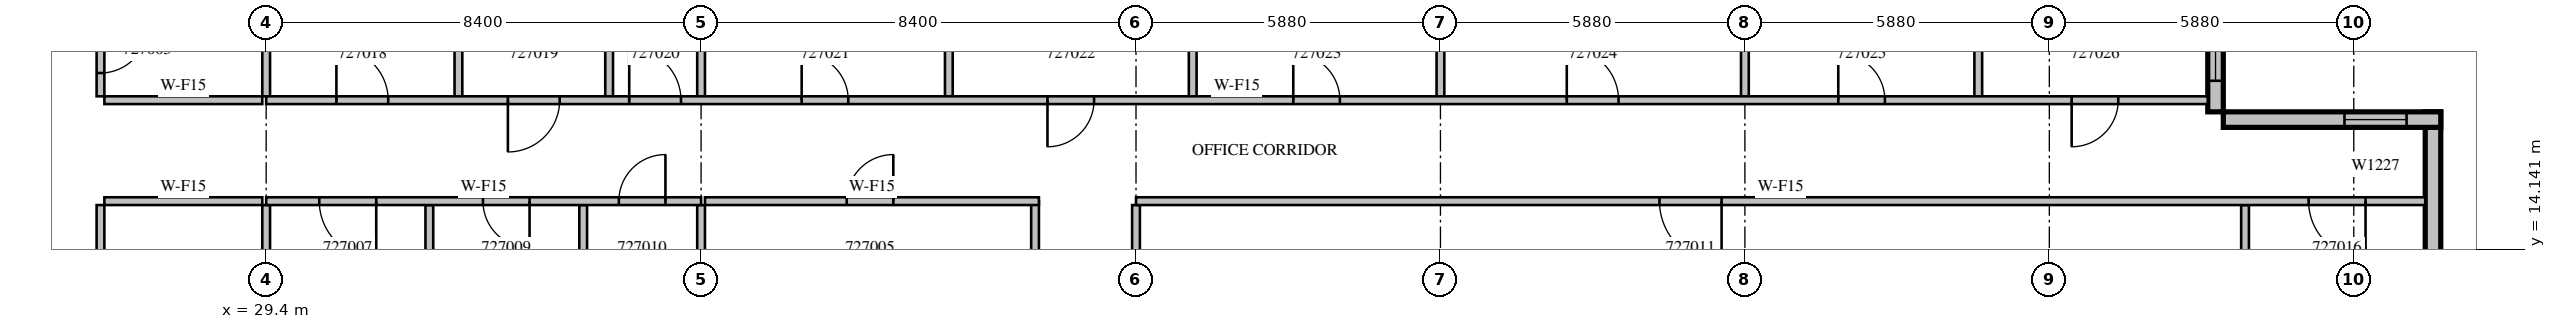
"""IFC4 building model, lengths in metres.
Left out: names, types, materials, properties, quantities, classifications, styles, units other than length and angle.
Written with IfcOpenShell. Run it as: python <this file> out.ifc"""

import sys

from ifc_helpers import new_model, si_unit, direction, frame, frame_2d, origin, place, context, subcontext, project, spatial, rectangle, extrude, source, transform, mapped, element, fill, save


model = new_model("IFC4")
c1 = context("Model", 3, precision=1e-05, world=origin(), true_north=direction((0.0, 1.0)))
c2 = subcontext(c1, "Body", "Model", "MODEL_VIEW")
j1 = project(units=[si_unit("LENGTHUNIT", "METRE"), si_unit("PLANEANGLEUNIT", "RADIAN")], contexts=[c1])
p1 = place(None, origin())
s1 = spatial("IfcSite", under=j1, at=p1, CompositionType="ELEMENT")
p2 = place(p1, origin())
s2 = spatial("IfcBuilding", under=s1, at=p2, CompositionType="ELEMENT")
p3 = place(p2, frame((0.0, 0.0, 124.5)))
s3 = spatial("IfcBuildingStorey", under=s2, at=p3, CompositionType="ELEMENT", Elevation=124.5)
m1 = source(origin(), c2, "Body", "SweptSolid", [
    extrude(rectangle(XDim=6.3, YDim=0.3, at=frame_2d((3.15, 0.0))), origin(), (0.0, 0.0, 1.0), 3.8),
])
p4 = place(p3, frame((71.25, 10.5, 0.0), z_axis=(0.0, 0.0, 1.0), x_axis=(0.0, 1.0, 0.0)))
e1 = element("IfcWall", 1, at=p4, inside=s3, PredefinedType="STANDARD", context=c2, shape_type="MappedRepresentation", body=[
    mapped(m1, transform((0.0, 0.0, 0.0), scale=1.0)),
])
m2 = source(origin(), c2, "Body", "SweptSolid", [
    extrude(rectangle(XDim=1.2, YDim=2.7, at=frame_2d((0.6, 1.35))), frame((0.0, 0.16, 0.0), z_axis=(0.0, -1.0, 0.0), x_axis=(1.0, 0.0, 0.0)), (0.0, 0.0, 1.0), 0.32),
])
p5 = place(p4, frame((1.025, 0.0, 0.6)))
e2 = element("IfcOpeningElement", 2, at=p5, cuts=e1, PredefinedType="OPENING", context=c2, shape_type="MappedRepresentation", body=[
    mapped(m2, transform((0.0, 0.0, 0.0), scale=1.0)),
])
m3 = source(origin(), c2, "Body", "SweptSolid", [
    extrude(rectangle(XDim=4.2, YDim=0.3, at=frame_2d((2.1, 0.0))), origin(), (0.0, 0.0, 1.0), 3.8),
])
p6 = place(p3, frame((71.4, 16.65, 0.0), z_axis=(0.0, 0.0, 1.0), x_axis=(-1.0, 0.0, 0.0)))
e3 = element("IfcWall", 3, at=p6, inside=s3, PredefinedType="STANDARD", context=c2, shape_type="MappedRepresentation", body=[
    mapped(m3, transform((0.0, 0.0, 0.0), scale=1.0)),
])
p7 = place(p6, frame((0.66, 0.0, 0.6)))
e4 = element("IfcOpeningElement", 4, at=p7, cuts=e3, PredefinedType="OPENING", context=c2, shape_type="MappedRepresentation", body=[
    mapped(m2, transform((0.0, 0.0, 0.0), scale=1.0)),
])
p8 = place(p3, frame((67.05, 16.8, 0.0), z_axis=(0.0, 0.0, 1.0), x_axis=(0.0, 1.0, 0.0)))
e5 = element("IfcWall", 5, at=p8, inside=s3, PredefinedType="STANDARD", context=c2, shape_type="MappedRepresentation", body=[
    mapped(m3, transform((0.0, 0.0, 0.0), scale=1.0)),
])
m4 = source(origin(), c2, "Body", "SweptSolid", [
    extrude(rectangle(XDim=3.0, YDim=2.7, at=frame_2d((1.5, 1.35))), frame((0.0, 0.16, 0.0), z_axis=(0.0, -1.0, 0.0), x_axis=(1.0, 0.0, 0.0)), (0.0, 0.0, 1.0), 0.32),
])
p9 = place(p8, frame((0.6, 0.0, 0.6)))
e6 = element("IfcOpeningElement", 6, at=p9, cuts=e5, PredefinedType="OPENING", context=c2, shape_type="MappedRepresentation", body=[
    mapped(m4, transform((0.0, 0.0, 0.0), scale=1.0)),
])
m5 = source(origin(), c2, "Body", "SweptSolid", [
    extrude(rectangle(XDim=11.725, YDim=0.15, at=frame_2d((5.862, 0.0))), origin(), (0.0, 0.0, 1.0), 3.8),
])
p10 = place(p3, frame((26.2, 15.0, 0.0), z_axis=(0.0, 0.0, 1.0), x_axis=(0.0, -1.0, 0.0)))
e7 = element("IfcWall", 7, at=p10, inside=s3, PredefinedType="PARTITIONING", context=c2, shape_type="MappedRepresentation", body=[
    mapped(m5, transform((0.0, 0.0, 0.0), scale=1.0)),
])
m6 = source(origin(), c2, "Body", "SweptSolid", [
    extrude(rectangle(XDim=0.9, YDim=2.1, at=frame_2d((0.45, 1.05))), frame((0.0, 0.085, 0.0), z_axis=(0.0, -1.0, 0.0), x_axis=(1.0, 0.0, 0.0)), (0.0, 0.0, 1.0), 0.17),
])
p11 = place(p10, frame((9.463, 0.0, 0.0)))
e8 = element("IfcOpeningElement", 8, at=p11, cuts=e7, PredefinedType="OPENING", context=c2, shape_type="MappedRepresentation", body=[
    mapped(m6, transform((0.0, 0.0, 0.0), scale=1.0)),
])
p12 = place(p10, frame((2.725, 0.0, 0.0)))
e9 = element("IfcOpeningElement", 9, at=p12, cuts=e7, PredefinedType="OPENING", context=c2, shape_type="MappedRepresentation", body=[
    mapped(m6, transform((0.0, 0.0, 0.0), scale=1.0)),
])
m7 = source(origin(), c2, "Body", "SweptSolid", [
    extrude(rectangle(XDim=3.6, YDim=0.15, at=frame_2d((1.8, 0.0))), origin(), (0.0, 0.0, 1.0), 3.8),
])
p13 = place(p3, frame((26.2, 20.7, 0.0), z_axis=(0.0, 0.0, 1.0), x_axis=(0.0, -1.0, 0.0)))
e10 = element("IfcWall", 10, at=p13, inside=s3, PredefinedType="PARTITIONING", context=c2, shape_type="MappedRepresentation", body=[
    mapped(m7, transform((0.0, 0.0, 0.0), scale=1.0)),
])
p14 = place(p13, frame((2.25, 0.0, 0.0)))
e11 = element("IfcOpeningElement", 11, at=p14, cuts=e10, PredefinedType="OPENING", context=c2, shape_type="MappedRepresentation", body=[
    mapped(m6, transform((0.0, 0.0, 0.0), scale=1.0)),
])
m8 = source(origin(), c2, "Body", "SweptSolid", [
    extrude(rectangle(XDim=3.05, YDim=0.15, at=frame_2d((1.525, 0.0))), origin(), (0.0, 0.0, 1.0), 3.8),
])
for number, where, z_axis, x_axis in (
    (12, (29.325, 15.075, 0.0), (0.0, 0.0, 1.0), (-1.0, 0.0, 0.0)),
    (13, (26.275, 17.025, 0.0), (0.0, 0.0, 1.0), (1.0, 0.0, 0.0)),
):
    element("IfcWall", number, at=place(p3, frame(where, z_axis=z_axis, x_axis=x_axis)), inside=s3, PredefinedType="PARTITIONING", context=c2, shape_type="MappedRepresentation", body=[
        mapped(m8, transform((0.0, 0.0, 0.0), scale=1.0)),
    ])
m9 = source(origin(), c2, "Body", "SweptSolid", [
    extrude(rectangle(XDim=3.976, YDim=0.15, at=frame_2d((1.988, 0.0))), origin(), (0.0, 0.0, 1.0), 3.8),
])
p15 = place(p3, frame((29.4, 11.024, 0.0), z_axis=(0.0, 0.0, 1.0), x_axis=(0.0, 1.0, 0.0)))
e14 = element("IfcWall", 14, at=p15, inside=s3, PredefinedType="PARTITIONING", context=c2, shape_type="MappedRepresentation", body=[
    mapped(m9, transform((0.0, 0.0, 0.0), scale=1.0)),
])
m10 = source(origin(), c2, "Body", "SweptSolid", [
    extrude(rectangle(XDim=2.851, YDim=0.15, at=frame_2d((1.425, 0.0))), origin(), (0.0, 0.0, 1.0), 3.8),
])
p16 = place(p3, frame((29.4, 17.1, 0.0), z_axis=(0.0, 0.0, 1.0), x_axis=(0.0, 1.0, 0.0)))
e15 = element("IfcWall", 15, at=p16, inside=s3, PredefinedType="PARTITIONING", context=c2, shape_type="MappedRepresentation", body=[
    mapped(m10, transform((0.0, 0.0, 0.0), scale=1.0)),
])
m11 = source(origin(), c2, "Body", "SweptSolid", [
    extrude(rectangle(XDim=3.175, YDim=0.15, at=frame_2d((1.587, 0.0))), origin(), (0.0, 0.0, 1.0), 3.8),
])
p17 = place(p3, frame((44.25, 11.9, 0.0), z_axis=(0.0, 0.0, 1.0), x_axis=(0.0, 1.0, 0.0)))
e16 = element("IfcWall", 16, at=p17, inside=s3, PredefinedType="PARTITIONING", context=c2, shape_type="MappedRepresentation", body=[
    mapped(m11, transform((0.0, 0.0, 0.0), scale=1.0)),
])
m12 = source(origin(), c2, "Body", "SweptSolid", [
    extrude(rectangle(XDim=6.45, YDim=0.15, at=frame_2d((3.225, 0.0))), origin(), (0.0, 0.0, 1.0), 3.8),
])
p18 = place(p3, frame((44.325, 15.075, 0.0), z_axis=(0.0, 0.0, 1.0), x_axis=(-1.0, 0.0, 0.0)))
e17 = element("IfcWall", 17, at=p18, inside=s3, PredefinedType="PARTITIONING", context=c2, shape_type="MappedRepresentation", body=[
    mapped(m12, transform((0.0, 0.0, 0.0), scale=1.0)),
])
p19 = place(p18, frame((2.812, 0.0, 0.0)))
e18 = element("IfcOpeningElement", 18, at=p19, cuts=e17, PredefinedType="OPENING", context=c2, shape_type="MappedRepresentation", body=[
    mapped(m6, transform((0.0, 0.0, 0.0), scale=1.0)),
])
m13 = source(origin(), c2, "Body", "SweptSolid", [
    extrude(rectangle(XDim=3.825, YDim=0.15, at=frame_2d((1.913, 0.0))), origin(), (0.0, 0.0, 1.0), 3.8),
])
for number, where, z_axis, x_axis in (
    (19, (32.551, 11.175, 0.0), (0.0, 0.0, 1.0), (0.0, 1.0, 0.0)),
    (20, (35.523, 11.175, 0.0), (0.0, 0.0, 1.0), (0.0, 1.0, 0.0)),
    (21, (37.8, 11.175, 0.0), (0.0, 0.0, 1.0), (0.0, 1.0, 0.0)),
    (22, (46.2, 11.175, 0.0), (0.0, 0.0, 1.0), (0.0, 1.0, 0.0)),
    (23, (67.62, 11.175, 0.0), (0.0, 0.0, 1.0), (0.0, 1.0, 0.0)),
):
    element("IfcWall", number, at=place(p3, frame(where, z_axis=z_axis, x_axis=x_axis)), inside=s3, PredefinedType="PARTITIONING", context=c2, shape_type="MappedRepresentation", body=[
        mapped(m13, transform((0.0, 0.0, 0.0), scale=1.0)),
    ])
for number, where, z_axis, x_axis in (
    (24, (33.113, 20.7, 0.0), (0.0, 0.0, 1.0), (0.0, -1.0, 0.0)),
    (25, (36.024, 20.7, 0.0), (0.0, 0.0, 1.0), (0.0, -1.0, 0.0)),
    (26, (42.585, 20.7, 0.0), (0.0, 0.0, 1.0), (0.0, -1.0, 0.0)),
    (27, (47.295, 20.7, 0.0), (0.0, 0.0, 1.0), (0.0, -1.0, 0.0)),
    (28, (62.468, 20.7, 0.0), (0.0, 0.0, 1.0), (0.0, -1.0, 0.0)),
):
    element("IfcWall", number, at=place(p3, frame(where, z_axis=z_axis, x_axis=x_axis)), inside=s3, PredefinedType="PARTITIONING", context=c2, shape_type="MappedRepresentation", body=[
        mapped(m7, transform((0.0, 0.0, 0.0), scale=1.0)),
    ])
for number, where, z_axis, x_axis in (
    (29, (37.8, 17.1, 0.0), (0.0, 0.0, 1.0), (0.0, 1.0, 0.0)),
    (30, (52.08, 17.1, 0.0), (0.0, 0.0, 1.0), (0.0, 1.0, 0.0)),
    (31, (57.96, 17.1, 0.0), (0.0, 0.0, 1.0), (0.0, 1.0, 0.0)),
):
    element("IfcWall", number, at=place(p3, frame(where, z_axis=z_axis, x_axis=x_axis)), inside=s3, PredefinedType="PARTITIONING", context=c2, shape_type="MappedRepresentation", body=[
        mapped(m10, transform((0.0, 0.0, 0.0), scale=1.0)),
    ])
m14 = source(origin(), c2, "Body", "SweptSolid", [
    extrude(rectangle(XDim=8.4, YDim=0.15, at=frame_2d((4.2, 0.0))), origin(), (0.0, 0.0, 1.0), 3.8),
])
p20 = place(p3, frame((37.8, 15.075, 0.0), z_axis=(0.0, 0.0, 1.0), x_axis=(-1.0, 0.0, 0.0)))
e32 = element("IfcWall", 32, at=p20, inside=s3, PredefinedType="PARTITIONING", context=c2, shape_type="MappedRepresentation", body=[
    mapped(m14, transform((0.0, 0.0, 0.0), scale=1.0)),
])
m15 = source(origin(), c2, "Body", "SweptSolid", [
    extrude(rectangle(XDim=1.1, YDim=2.1, at=frame_2d((0.55, 1.05))), frame((0.0, 0.085, 0.0), z_axis=(0.0, -1.0, 0.0), x_axis=(1.0, 0.0, 0.0)), (0.0, 0.0, 1.0), 0.17),
])
p21 = place(p20, frame((6.274, 0.0, 0.0)))
e33 = element("IfcOpeningElement", 33, at=p21, cuts=e32, PredefinedType="OPENING", context=c2, shape_type="MappedRepresentation", body=[
    mapped(m15, transform((0.0, 0.0, 0.0), scale=1.0)),
])
p22 = place(p20, frame((3.313, 0.0, 0.0)))
e34 = element("IfcOpeningElement", 34, at=p22, cuts=e32, PredefinedType="OPENING", context=c2, shape_type="MappedRepresentation", body=[
    mapped(m6, transform((0.0, 0.0, 0.0), scale=1.0)),
])
p23 = place(p20, frame((0.689, 0.0, 0.0)))
e35 = element("IfcOpeningElement", 35, at=p23, cuts=e32, PredefinedType="OPENING", context=c2, shape_type="MappedRepresentation", body=[
    mapped(m6, transform((0.0, 0.0, 0.0), scale=1.0)),
])
m16 = source(origin(), c2, "Body", "SweptSolid", [
    extrude(rectangle(XDim=24.9, YDim=0.15, at=frame_2d((12.45, 0.0))), origin(), (0.0, 0.0, 1.0), 3.8),
])
p24 = place(p3, frame((71.1, 15.075, 0.0), z_axis=(0.0, 0.0, 1.0), x_axis=(-1.0, 0.0, 0.0)))
e36 = element("IfcWall", 36, at=p24, inside=s3, PredefinedType="PARTITIONING", context=c2, shape_type="MappedRepresentation", body=[
    mapped(m16, transform((0.0, 0.0, 0.0), scale=1.0)),
])
m17 = source(origin(), c2, "Body", "SweptSolid", [
    extrude(rectangle(XDim=1.2, YDim=2.1, at=frame_2d((0.6, 1.05))), frame((0.0, 0.085, 0.0), z_axis=(0.0, -1.0, 0.0), x_axis=(1.0, 0.0, 0.0)), (0.0, 0.0, 1.0), 0.17),
])
p25 = place(p24, frame((13.59, 0.0, 0.0)))
e37 = element("IfcOpeningElement", 37, at=p25, cuts=e36, PredefinedType="OPENING", context=c2, shape_type="MappedRepresentation", body=[
    mapped(m17, transform((0.0, 0.0, 0.0), scale=1.0)),
])
p26 = place(p24, frame((1.153, 0.0, 0.0)))
e38 = element("IfcOpeningElement", 38, at=p26, cuts=e36, PredefinedType="OPENING", context=c2, shape_type="MappedRepresentation", body=[
    mapped(m15, transform((0.0, 0.0, 0.0), scale=1.0)),
])
m18 = source(origin(), c2, "Body", "SweptSolid", [
    extrude(rectangle(XDim=37.5, YDim=0.15, at=frame_2d((18.75, 0.0))), origin(), (0.0, 0.0, 1.0), 3.8),
])
p27 = place(p3, frame((29.4, 17.025, 0.0), z_axis=(0.0, 0.0, 1.0), x_axis=(1.0, 0.0, 0.0)))
e39 = element("IfcWall", 39, at=p27, inside=s3, PredefinedType="PARTITIONING", context=c2, shape_type="MappedRepresentation", body=[
    mapped(m18, transform((0.0, 0.0, 0.0), scale=1.0)),
])
m19 = source(origin(), c2, "Body", "SweptSolid", [
    extrude(rectangle(XDim=1.0, YDim=2.1, at=frame_2d((0.5, 1.05))), frame((0.0, 0.085, 0.0), z_axis=(0.0, -1.0, 0.0), x_axis=(1.0, 0.0, 0.0)), (0.0, 0.0, 1.0), 0.17),
])
p28 = place(p27, frame((1.357, 0.0, 0.0)))
e40 = element("IfcOpeningElement", 40, at=p28, cuts=e39, PredefinedType="OPENING", context=c2, shape_type="MappedRepresentation", body=[
    mapped(m19, transform((0.0, 0.0, 0.0), scale=1.0)),
])
p29 = place(p27, frame((4.669, 0.0, 0.0)))
e41 = element("IfcOpeningElement", 41, at=p29, cuts=e39, PredefinedType="OPENING", context=c2, shape_type="MappedRepresentation", body=[
    mapped(m19, transform((0.0, 0.0, 0.0), scale=1.0)),
])
p30 = place(p27, frame((7.012, 0.0, 0.0)))
e42 = element("IfcOpeningElement", 42, at=p30, cuts=e39, PredefinedType="OPENING", context=c2, shape_type="MappedRepresentation", body=[
    mapped(m19, transform((0.0, 0.0, 0.0), scale=1.0)),
])
p31 = place(p27, frame((10.342, 0.0, 0.0)))
e43 = element("IfcOpeningElement", 43, at=p31, cuts=e39, PredefinedType="OPENING", context=c2, shape_type="MappedRepresentation", body=[
    mapped(m6, transform((0.0, 0.0, 0.0), scale=1.0)),
])
p32 = place(p27, frame((15.09, 0.0, 0.0)))
e44 = element("IfcOpeningElement", 44, at=p32, cuts=e39, PredefinedType="OPENING", context=c2, shape_type="MappedRepresentation", body=[
    mapped(m6, transform((0.0, 0.0, 0.0), scale=1.0)),
])
p33 = place(p27, frame((19.837, 0.0, 0.0)))
e45 = element("IfcOpeningElement", 45, at=p33, cuts=e39, PredefinedType="OPENING", context=c2, shape_type="MappedRepresentation", body=[
    mapped(m6, transform((0.0, 0.0, 0.0), scale=1.0)),
])
p34 = place(p27, frame((25.12, 0.0, 0.0)))
e46 = element("IfcOpeningElement", 46, at=p34, cuts=e39, PredefinedType="OPENING", context=c2, shape_type="MappedRepresentation", body=[
    mapped(m19, transform((0.0, 0.0, 0.0), scale=1.0)),
])
p35 = place(p27, frame((30.364, 0.0, 0.0)))
e47 = element("IfcOpeningElement", 47, at=p35, cuts=e39, PredefinedType="OPENING", context=c2, shape_type="MappedRepresentation", body=[
    mapped(m6, transform((0.0, 0.0, 0.0), scale=1.0)),
])
p36 = place(p27, frame((34.871, 0.0, 0.0)))
e48 = element("IfcOpeningElement", 48, at=p36, cuts=e39, PredefinedType="OPENING", context=c2, shape_type="MappedRepresentation", body=[
    mapped(m6, transform((0.0, 0.0, 0.0), scale=1.0)),
])
m20 = source(origin(), c2, "Body", "SweptSolid", [
    extrude(rectangle(XDim=1.2, YDim=2.7, at=frame_2d((0.6, 1.35))), frame((0.0, 0.03, 0.0), z_axis=(0.0, -1.0, 0.0), x_axis=(1.0, 0.0, 0.0)), (0.0, 0.0, 1.0), 0.06),
])
p37 = place(p7, origin())
e49 = element("IfcWindow", 49, at=p37, inside=s3, PartitioningType="SINGLE_PANEL", PredefinedType="WINDOW", context=c2, shape_type="MappedRepresentation", body=[
    mapped(m20, transform((0.0, 0.0, 0.0), scale=1.0)),
])
fill(e4, e49)
m21 = source(origin(), c2, "Body", "SweptSolid", [
    extrude(rectangle(XDim=3.0, YDim=2.7, at=frame_2d((1.5, 1.35))), frame((0.0, 0.03, 0.0), z_axis=(0.0, -1.0, 0.0), x_axis=(1.0, 0.0, 0.0)), (0.0, 0.0, 1.0), 0.06),
])
p38 = place(p9, origin())
e50 = element("IfcWindow", 50, at=p38, inside=s3, PartitioningType="SINGLE_PANEL", PredefinedType="WINDOW", context=c2, shape_type="MappedRepresentation", body=[
    mapped(m21, transform((0.0, 0.0, 0.0), scale=1.0)),
])
fill(e6, e50)
m22 = source(origin(), c2, "Body", "SweptSolid", [
    extrude(rectangle(XDim=0.9, YDim=2.1, at=frame_2d((0.45, 1.05))), frame((0.0, 0.025, 0.0), z_axis=(0.0, -1.0, 0.0), x_axis=(1.0, 0.0, 0.0)), (0.0, 0.0, 1.0), 0.05),
])
p39 = place(p14, origin())
e51 = element("IfcDoor", 51, at=p39, inside=s3, OperationType="SINGLE_SWING_LEFT", PredefinedType="DOOR", context=c2, shape_type="MappedRepresentation", body=[
    mapped(m22, transform((0.0, 0.0, 0.0), scale=1.0)),
])
fill(e11, e51)
p40 = place(p19, origin())
e52 = element("IfcDoor", 52, at=p40, inside=s3, OperationType="SINGLE_SWING_RIGHT", PredefinedType="DOOR", context=c2, shape_type="MappedRepresentation", body=[
    mapped(m22, transform((0.0, 0.0, 0.0), scale=1.0)),
])
fill(e18, e52)
m23 = source(origin(), c2, "Body", "SweptSolid", [
    extrude(rectangle(XDim=1.1, YDim=2.1, at=frame_2d((0.55, 1.05))), frame((0.0, 0.025, 0.0), z_axis=(0.0, -1.0, 0.0), x_axis=(1.0, 0.0, 0.0)), (0.0, 0.0, 1.0), 0.05),
])
p41 = place(p21, origin())
e53 = element("IfcDoor", 53, at=p41, inside=s3, OperationType="SINGLE_SWING_LEFT", PredefinedType="DOOR", context=c2, shape_type="MappedRepresentation", body=[
    mapped(m23, transform((0.0, 0.0, 0.0), scale=1.0)),
])
fill(e33, e53)
p42 = place(p22, origin())
e54 = element("IfcDoor", 54, at=p42, inside=s3, OperationType="SINGLE_SWING_LEFT", PredefinedType="DOOR", context=c2, shape_type="MappedRepresentation", body=[
    mapped(m22, transform((0.0, 0.0, 0.0), scale=1.0)),
])
fill(e34, e54)
p43 = place(p23, origin())
e55 = element("IfcDoor", 55, at=p43, inside=s3, OperationType="SINGLE_SWING_RIGHT", PredefinedType="DOOR", context=c2, shape_type="MappedRepresentation", body=[
    mapped(m22, transform((0.0, 0.0, 0.0), scale=1.0)),
])
fill(e35, e55)
m24 = source(origin(), c2, "Body", "SweptSolid", [
    extrude(rectangle(XDim=1.2, YDim=2.1, at=frame_2d((0.6, 1.05))), frame((0.0, 0.025, 0.0), z_axis=(0.0, -1.0, 0.0), x_axis=(1.0, 0.0, 0.0)), (0.0, 0.0, 1.0), 0.05),
])
p44 = place(p25, origin())
e56 = element("IfcDoor", 56, at=p44, inside=s3, OperationType="SINGLE_SWING_LEFT", PredefinedType="DOOR", context=c2, shape_type="MappedRepresentation", body=[
    mapped(m24, transform((0.0, 0.0, 0.0), scale=1.0)),
])
fill(e37, e56)
p45 = place(p26, origin())
e57 = element("IfcDoor", 57, at=p45, inside=s3, OperationType="SINGLE_SWING_LEFT", PredefinedType="DOOR", context=c2, shape_type="MappedRepresentation", body=[
    mapped(m23, transform((0.0, 0.0, 0.0), scale=1.0)),
])
fill(e38, e57)
m25 = source(origin(), c2, "Body", "SweptSolid", [
    extrude(rectangle(XDim=1.0, YDim=2.1, at=frame_2d((0.5, 1.05))), frame((0.0, 0.025, 0.0), z_axis=(0.0, -1.0, 0.0), x_axis=(1.0, 0.0, 0.0)), (0.0, 0.0, 1.0), 0.05),
])
p46 = place(p28, origin())
e58 = element("IfcDoor", 58, at=p46, inside=s3, OperationType="SINGLE_SWING_LEFT", PredefinedType="DOOR", context=c2, shape_type="MappedRepresentation", body=[
    mapped(m25, transform((0.0, 0.0, 0.0), scale=1.0)),
])
fill(e40, e58)
p47 = place(p29, origin())
e59 = element("IfcDoor", 59, at=p47, inside=s3, OperationType="SINGLE_SWING_RIGHT", PredefinedType="DOOR", context=c2, shape_type="MappedRepresentation", body=[
    mapped(m25, transform((0.0, 0.0, 0.0), scale=1.0)),
])
fill(e41, e59)
p48 = place(p30, origin())
e60 = element("IfcDoor", 60, at=p48, inside=s3, OperationType="SINGLE_SWING_LEFT", PredefinedType="DOOR", context=c2, shape_type="MappedRepresentation", body=[
    mapped(m25, transform((0.0, 0.0, 0.0), scale=1.0)),
])
fill(e42, e60)
p49 = place(p31, origin())
e61 = element("IfcDoor", 61, at=p49, inside=s3, OperationType="SINGLE_SWING_LEFT", PredefinedType="DOOR", context=c2, shape_type="MappedRepresentation", body=[
    mapped(m22, transform((0.0, 0.0, 0.0), scale=1.0)),
])
fill(e43, e61)
p50 = place(p32, origin())
e62 = element("IfcDoor", 62, at=p50, inside=s3, OperationType="SINGLE_SWING_RIGHT", PredefinedType="DOOR", context=c2, shape_type="MappedRepresentation", body=[
    mapped(m22, transform((0.0, 0.0, 0.0), scale=1.0)),
])
fill(e44, e62)
p51 = place(p33, origin())
e63 = element("IfcDoor", 63, at=p51, inside=s3, OperationType="SINGLE_SWING_LEFT", PredefinedType="DOOR", context=c2, shape_type="MappedRepresentation", body=[
    mapped(m22, transform((0.0, 0.0, 0.0), scale=1.0)),
])
fill(e45, e63)
p52 = place(p34, origin())
e64 = element("IfcDoor", 64, at=p52, inside=s3, OperationType="SINGLE_SWING_LEFT", PredefinedType="DOOR", context=c2, shape_type="MappedRepresentation", body=[
    mapped(m25, transform((0.0, 0.0, 0.0), scale=1.0)),
])
fill(e46, e64)
p53 = place(p35, origin())
e65 = element("IfcDoor", 65, at=p53, inside=s3, OperationType="SINGLE_SWING_LEFT", PredefinedType="DOOR", context=c2, shape_type="MappedRepresentation", body=[
    mapped(m22, transform((0.0, 0.0, 0.0), scale=1.0)),
])
fill(e47, e65)
p54 = place(p36, origin())
e66 = element("IfcDoor", 66, at=p54, inside=s3, OperationType="SINGLE_SWING_RIGHT", PredefinedType="DOOR", context=c2, shape_type="MappedRepresentation", body=[
    mapped(m22, transform((0.0, 0.0, 0.0), scale=1.0)),
])
fill(e48, e66)
save(model, sys.argv[1])
